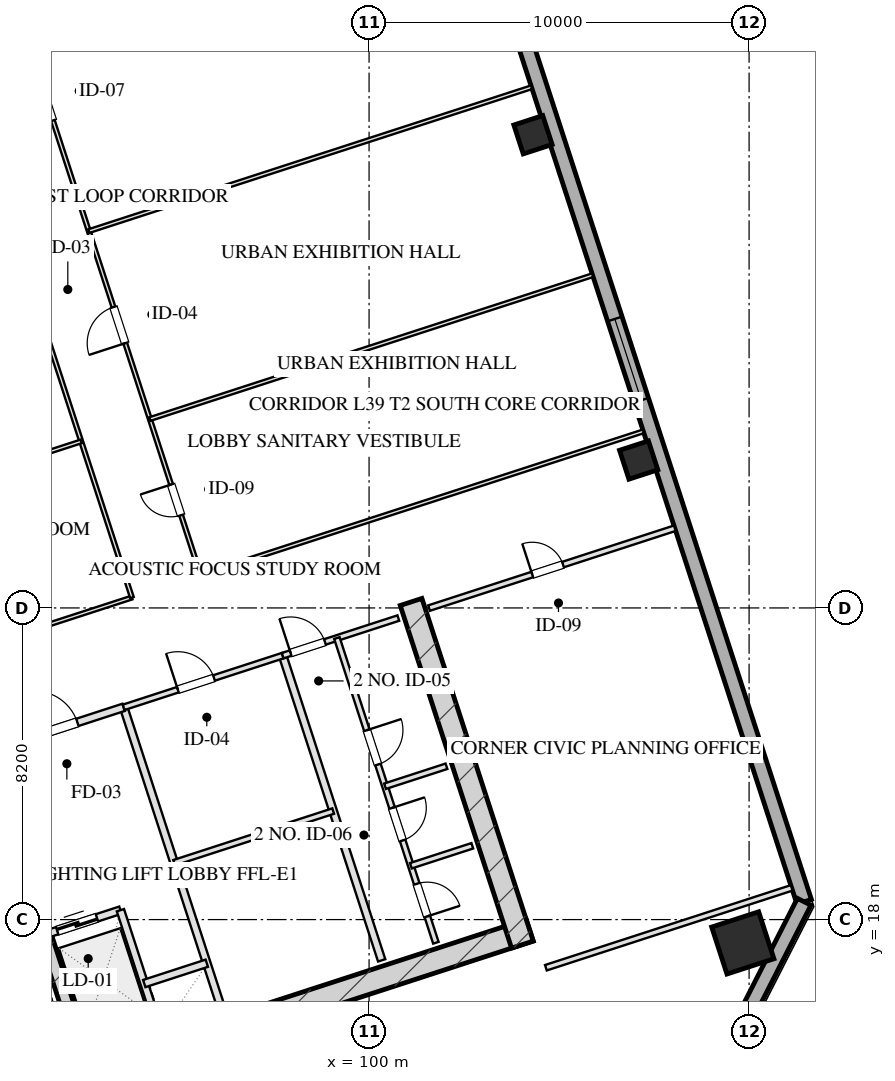
"""IFC4 building model, lengths in metres.
Left out: names, types, materials, properties, quantities, classifications, styles, units other than length and angle.
Written with IfcOpenShell. Run it as: python <this file> out.ifc"""

import sys

from ifc_helpers import new_model, si_unit, direction, frame, frame_2d, origin, origin_2d, place, context, subcontext, project, spatial, rectangle, hollow_rectangle, extrude, element, fill, save


model = new_model("IFC4")
c1 = context("Model", 3, precision=1e-05, world=origin(), true_north=direction((0.0, 1.0)))
c2 = subcontext(c1, "Body", "Model", "MODEL_VIEW")
j1 = project(units=[si_unit("LENGTHUNIT", "METRE"), si_unit("PLANEANGLEUNIT", "RADIAN")], contexts=[c1])
p1 = place(None, origin())
s1 = spatial("IfcSite", under=j1, at=p1, CompositionType="ELEMENT")
p2 = place(p1, origin())
s2 = spatial("IfcBuilding", under=s1, at=p2, CompositionType="ELEMENT")
p3 = place(p2, frame((0.0, 0.0, 149.5)))
s3 = spatial("IfcBuildingStorey", under=s2, at=p3, CompositionType="ELEMENT", Elevation=149.5)
p4 = place(p3, frame((88.63, 12.652, 0.0), z_axis=(0.0, 0.0, 1.0), x_axis=(0.95105714907, 0.309015046886, 0.0)))
e1 = element("IfcWall", 1, at=p4, inside=s3, PredefinedType="SHEAR", context=c2, shape_type="SweptSolid", body=[
    extrude(rectangle(XDim=16.4, YDim=0.6, at=frame_2d((8.2, 0.0))), origin(), (0.0, 0.0, 1.0), 3.45),
])
p5 = place(p3, frame((101.105, 26.358, 0.0), z_axis=(0.0, 0.0, 1.0), x_axis=(0.309010370028, -0.95105866865, 0.0)))
e2 = element("IfcWall", 2, at=p5, inside=s3, PredefinedType="SHEAR", context=c2, shape_type="SweptSolid", body=[
    extrude(rectangle(XDim=9.48, YDim=0.6, at=frame_2d((4.74, 0.0))), origin(), (0.0, 0.0, 1.0), 3.45),
])
p6 = place(p3, frame((90.486, 20.594, 0.0), z_axis=(0.0, 0.0, 1.0), x_axis=(0.309020428229, -0.951055400562, 0.0)))
e3 = element("IfcWall", 3, at=p6, inside=s3, PredefinedType="SHEAR", context=c2, shape_type="SweptSolid", body=[
    extrude(rectangle(XDim=6.98, YDim=0.35, at=frame_2d((3.49, 0.0))), origin(), (0.0, 0.0, 1.0), 3.45),
])
p7 = place(p3, frame((109.835, 17.386, 0.0), z_axis=(0.0, 0.0, 1.0), x_axis=(0.951056516295, 0.309016994375, 0.0)))
e4 = element("IfcColumn", 4, at=p7, inside=s3, PredefinedType="COLUMN", context=c2, shape_type="SweptSolid", body=[
    extrude(hollow_rectangle(XDim=1.3, YDim=1.3, WallThickness=0.045, at=origin_2d()), origin(), (0.0, 0.0, 1.0), 3.451),
])
for number, where, z_axis, x_axis in (
    (5, (107.094, 30.091, 0.0), (0.0, 0.0, 1.0), (0.951, 0.309, 0.0)),
    (6, (104.313, 38.651, 0.0), (0.0, 0.0, 1.0), (0.951, 0.309, 0.0)),
):
    element("IfcColumn", number, at=place(p3, frame(where, z_axis=z_axis, x_axis=x_axis)), inside=s3, PredefinedType="COLUMN", context=c2, shape_type="SweptSolid", body=[
        extrude(hollow_rectangle(XDim=0.8, YDim=0.8, WallThickness=0.028, at=origin_2d()), origin(), (0.0, 0.0, 1.0), 3.451),
    ])
p8 = place(p3, frame((98.224, 59.173, 0.0), z_axis=(0.0, 0.0, 1.0), x_axis=(0.309014228706, -0.951057414911, 0.0)))
e7 = element("IfcWall", 7, at=p8, inside=s3, PredefinedType="SOLIDWALL", context=c2, shape_type="SweptSolid", body=[
    extrude(rectangle(XDim=42.8, YDim=0.4, at=frame_2d((21.4, 0.0))), origin(), (0.0, 0.0, 1.0), 2.61),
])
p9 = place(p8, frame((26.675, 0.0, 0.75)))
e8 = element("IfcOpeningElement", 8, at=p9, cuts=e7, PredefinedType="OPENING", context=c2, shape_type="SweptSolid", body=[
    extrude(rectangle(XDim=2.25, YDim=1.46, at=frame_2d((1.125, 0.73))), frame((0.0, 0.21, 0.0), z_axis=(0.0, -1.0, 0.0), x_axis=(1.0, 0.0, 0.0)), (0.0, 0.0, 1.0), 0.42),
])
p10 = place(p8, frame((13.875, 0.0, 0.75)))
e9 = element("IfcOpeningElement", 9, at=p10, cuts=e7, PredefinedType="OPENING", context=c2, shape_type="SweptSolid", body=[
    extrude(rectangle(XDim=2.25, YDim=1.46, at=frame_2d((1.125, 0.73))), frame((0.0, 0.21, 0.0), z_axis=(0.0, -1.0, 0.0), x_axis=(1.0, 0.0, 0.0)), (0.0, 0.0, 1.0), 0.42),
])
p11 = place(p3, frame((111.449, 18.468, 0.0), z_axis=(0.0, 0.0, 1.0), x_axis=(-0.454019523198, -0.890991735402, 0.0)))
e10 = element("IfcWall", 10, at=p11, inside=s3, PredefinedType="SOLIDWALL", context=c2, shape_type="SweptSolid", body=[
    extrude(rectangle(XDim=3.394, YDim=0.4, at=frame_2d((1.697, 0.0))), origin(), (0.0, 0.0, 1.0), 2.61),
])
p12 = place(p3, frame((93.542, 23.585, 0.0), z_axis=(0.0, 0.0, 1.0), x_axis=(0.309042196757, -0.951048327176, 0.0)))
e11 = element("IfcWall", 11, at=p12, inside=s3, PredefinedType="PARTITIONING", context=c2, shape_type="SweptSolid", body=[
    extrude(rectangle(XDim=8.43, YDim=0.2, at=frame_2d((4.215, 0.0))), origin(), (0.0, 0.0, 1.0), 3.175),
])
p13 = place(p3, frame((89.899, 22.401, 0.0), z_axis=(0.0, 0.0, 1.0), x_axis=(0.951046716504, 0.309047153403, 0.0)))
e12 = element("IfcWall", 12, at=p13, inside=s3, PredefinedType="PARTITIONING", context=c2, shape_type="SweptSolid", body=[
    extrude(rectangle(XDim=3.83, YDim=0.2, at=frame_2d((1.915, 0.0))), origin(), (0.0, 0.0, 1.0), 3.175),
])
p14 = place(p13, frame((1.35, 0.0, 0.0)))
e13 = element("IfcOpeningElement", 13, at=p14, cuts=e12, PredefinedType="OPENING", context=c2, shape_type="SweptSolid", body=[
    extrude(rectangle(XDim=1.2, YDim=2.05, at=frame_2d((0.6, 1.025))), frame((0.0, 0.11, 0.0), z_axis=(0.0, -1.0, 0.0), x_axis=(1.0, 0.0, 0.0)), (0.0, 0.0, 1.0), 0.22),
])
p15 = place(p3, frame((91.46, 17.598, 0.0), z_axis=(0.0, 0.0, 1.0), x_axis=(0.951062257173, 0.308999325213, 0.0)))
e14 = element("IfcWall", 14, at=p15, inside=s3, PredefinedType="PARTITIONING", context=c2, shape_type="SweptSolid", body=[
    extrude(rectangle(XDim=2.1, YDim=0.2, at=frame_2d((1.05, 0.0))), origin(), (0.0, 0.0, 1.0), 3.175),
])
p16 = place(p15, frame((0.35, 0.0, 0.0)))
e15 = element("IfcOpeningElement", 15, at=p16, cuts=e14, PredefinedType="OPENING", context=c2, shape_type="SweptSolid", body=[
    extrude(rectangle(XDim=1.1, YDim=2.05, at=frame_2d((0.55, 1.025))), frame((0.0, 0.11, 0.0), z_axis=(0.0, -1.0, 0.0), x_axis=(1.0, 0.0, 0.0)), (0.0, 0.0, 1.0), 0.22),
])
p17 = place(p3, frame((93.457, 18.247, 0.0), z_axis=(0.0, 0.0, 1.0), x_axis=(0.3089935693, -0.951064127245, 0.0)))
e16 = element("IfcWall", 16, at=p17, inside=s3, PredefinedType="PARTITIONING", context=c2, shape_type="SweptSolid", body=[
    extrude(rectangle(XDim=3.7, YDim=0.2, at=frame_2d((1.85, 0.0))), origin(), (0.0, 0.0, 1.0), 3.175),
])
p18 = place(p3, frame((94.084, 16.317, 0.0), z_axis=(0.0, 0.0, 1.0), x_axis=(0.951041328149, 0.309063734775, 0.0)))
e17 = element("IfcWall", 17, at=p18, inside=s3, PredefinedType="PARTITIONING", context=c2, shape_type="SweptSolid", body=[
    extrude(rectangle(XDim=1.73, YDim=0.2, at=frame_2d((0.865, 0.0))), origin(), (0.0, 0.0, 1.0), 3.175),
])
p19 = place(p3, frame((97.727, 24.944, 0.0), z_axis=(0.0, 0.0, 1.0), x_axis=(0.309016001439, -0.951056838919, 0.0)))
e18 = element("IfcWall", 18, at=p19, inside=s3, PredefinedType="PARTITIONING", context=c2, shape_type="SweptSolid", body=[
    extrude(rectangle(XDim=8.43, YDim=0.2, at=frame_2d((4.215, 0.0))), origin(), (0.0, 0.0, 1.0), 3.175),
])
p20 = place(p3, frame((93.542, 23.585, 0.0), z_axis=(0.0, 0.0, 1.0), x_axis=(0.951063829732, 0.308994485023, 0.0)))
e19 = element("IfcWall", 19, at=p20, inside=s3, PredefinedType="PARTITIONING", context=c2, shape_type="SweptSolid", body=[
    extrude(rectangle(XDim=4.4, YDim=0.15, at=frame_2d((2.2, 0.0))), origin(), (0.0, 0.0, 1.0), 3.175),
])
p21 = place(p20, frame((1.5, 0.0, 0.0)))
e20 = element("IfcOpeningElement", 20, at=p21, cuts=e19, PredefinedType="OPENING", context=c2, shape_type="SweptSolid", body=[
    extrude(rectangle(XDim=1.0, YDim=2.05, at=frame_2d((0.5, 1.025))), frame((0.0, 0.085, 0.0), z_axis=(0.0, -1.0, 0.0), x_axis=(1.0, 0.0, 0.0)), (0.0, 0.0, 1.0), 0.17),
])
p22 = place(p3, frame((94.871, 19.495, 0.0), z_axis=(0.0, 0.0, 1.0), x_axis=(0.951042223598, 0.309060979314, 0.0)))
e21 = element("IfcWall", 21, at=p22, inside=s3, PredefinedType="PARTITIONING", context=c2, shape_type="SweptSolid", body=[
    extrude(rectangle(XDim=4.4, YDim=0.15, at=frame_2d((2.2, 0.0))), origin(), (0.0, 0.0, 1.0), 3.175),
])
p23 = place(p3, frame((97.727, 24.944, 0.0), z_axis=(0.0, 0.0, 1.0), x_axis=(0.951036872128, 0.309077446369, 0.0)))
e22 = element("IfcWall", 22, at=p23, inside=s3, PredefinedType="PARTITIONING", context=c2, shape_type="SweptSolid", body=[
    extrude(rectangle(XDim=3.2, YDim=0.15, at=frame_2d((1.6, 0.0))), origin(), (0.0, 0.0, 1.0), 3.175),
])
p24 = place(p23, frame((0.22, 0.0, 0.0)))
e23 = element("IfcOpeningElement", 23, at=p24, cuts=e22, PredefinedType="OPENING", context=c2, shape_type="SweptSolid", body=[
    extrude(rectangle(XDim=0.95, YDim=2.05, at=frame_2d((0.475, 1.025))), frame((0.0, 0.085, 0.0), z_axis=(0.0, -1.0, 0.0), x_axis=(1.0, 0.0, 0.0)), (0.0, 0.0, 1.0), 0.17),
])
p25 = place(p3, frame((99.153, 25.408, 0.0), z_axis=(0.0, 0.0, 1.0), x_axis=(0.309016001439, -0.951056838919, 0.0)))
e24 = element("IfcWall", 24, at=p25, inside=s3, PredefinedType="PARTITIONING", context=c2, shape_type="SweptSolid", body=[
    extrude(rectangle(XDim=8.43, YDim=0.15, at=frame_2d((4.215, 0.0))), origin(), (0.0, 0.0, 1.0), 3.175),
])
p26 = place(p25, frame((2.55, 0.0, 0.0)))
e25 = element("IfcOpeningElement", 25, at=p26, cuts=e24, PredefinedType="OPENING", context=c2, shape_type="SweptSolid", body=[
    extrude(rectangle(XDim=0.95, YDim=2.05, at=frame_2d((0.475, 1.025))), frame((0.0, 0.085, 0.0), z_axis=(0.0, -1.0, 0.0), x_axis=(1.0, 0.0, 0.0)), (0.0, 0.0, 1.0), 0.17),
])
p27 = place(p25, frame((4.7, 0.0, 0.0)))
e26 = element("IfcOpeningElement", 26, at=p27, cuts=e24, PredefinedType="OPENING", context=c2, shape_type="SweptSolid", body=[
    extrude(rectangle(XDim=0.9, YDim=2.05, at=frame_2d((0.45, 1.025))), frame((0.0, 0.085, 0.0), z_axis=(0.0, -1.0, 0.0), x_axis=(1.0, 0.0, 0.0)), (0.0, 0.0, 1.0), 0.17),
])
p28 = place(p25, frame((6.8, 0.0, 0.0)))
e27 = element("IfcOpeningElement", 27, at=p28, cuts=e24, PredefinedType="OPENING", context=c2, shape_type="SweptSolid", body=[
    extrude(rectangle(XDim=0.9, YDim=2.05, at=frame_2d((0.45, 1.025))), frame((0.0, 0.085, 0.0), z_axis=(0.0, -1.0, 0.0), x_axis=(1.0, 0.0, 0.0)), (0.0, 0.0, 1.0), 0.17),
])
p29 = place(p3, frame((100.42, 21.509, 0.0), z_axis=(0.0, 0.0, 1.0), x_axis=(0.951040401051, 0.309066587596, 0.0)))
e28 = element("IfcWall", 28, at=p29, inside=s3, PredefinedType="PARTITIONING", context=c2, shape_type="SweptSolid", body=[
    extrude(rectangle(XDim=1.7, YDim=0.15, at=frame_2d((0.85, 0.0))), origin(), (0.0, 0.0, 1.0), 3.175),
])
p30 = place(p3, frame((101.1, 19.416, 0.0), z_axis=(0.0, 0.0, 1.0), x_axis=(0.951054116971, 0.309024378638, 0.0)))
e29 = element("IfcWall", 29, at=p30, inside=s3, PredefinedType="PARTITIONING", context=c2, shape_type="SweptSolid", body=[
    extrude(rectangle(XDim=1.7, YDim=0.15, at=frame_2d((0.85, 0.0))), origin(), (0.0, 0.0, 1.0), 3.175),
])
p31 = place(p3, frame((104.653, 16.733, 0.0), z_axis=(0.0, 0.0, 1.0), x_axis=(0.951054383043, 0.309023559774, 0.0)))
e30 = element("IfcWall", 30, at=p31, inside=s3, PredefinedType="PARTITIONING", context=c2, shape_type="SweptSolid", body=[
    extrude(rectangle(XDim=6.8, YDim=0.15, at=frame_2d((3.4, 0.0))), origin(), (0.0, 0.0, 1.0), 3.175),
])
p32 = place(p3, frame((101.578, 26.196, 0.0), z_axis=(0.0, 0.0, 1.0), x_axis=(0.951064934653, 0.308991084134, 0.0)))
e31 = element("IfcWall", 31, at=p32, inside=s3, PredefinedType="PARTITIONING", context=c2, shape_type="SweptSolid", body=[
    extrude(rectangle(XDim=6.8, YDim=0.15, at=frame_2d((3.4, 0.0))), origin(), (0.0, 0.0, 1.0), 3.175),
])
p33 = place(p32, frame((2.856, 0.0, 0.0)))
e32 = element("IfcOpeningElement", 32, at=p33, cuts=e31, PredefinedType="OPENING", context=c2, shape_type="SweptSolid", body=[
    extrude(rectangle(XDim=0.85, YDim=2.05, at=frame_2d((0.425, 1.025))), frame((0.0, 0.085, 0.0), z_axis=(0.0, -1.0, 0.0), x_axis=(1.0, 0.0, 0.0)), (0.0, 0.0, 1.0), 0.17),
])
p34 = place(p3, frame((85.248, 23.708, 0.0), z_axis=(0.0, 0.0, 1.0), x_axis=(0.951059123431, 0.309008970321, 0.0)))
e33 = element("IfcWall", 33, at=p34, inside=s3, PredefinedType="MOVABLE", context=c2, shape_type="SweptSolid", body=[
    extrude(rectangle(XDim=8.95, YDim=0.1, at=frame_2d((4.475, 0.0))), origin(), (0.0, 0.0, 1.0), 3.175),
])
p35 = place(p3, frame((95.567, 27.061, 0.0), z_axis=(0.0, 0.0, 1.0), x_axis=(0.9510516424, 0.30903199428, 0.0)))
e34 = element("IfcWall", 34, at=p35, inside=s3, PredefinedType="MOVABLE", context=c2, shape_type="SweptSolid", body=[
    extrude(rectangle(XDim=12.25, YDim=0.1, at=frame_2d((6.125, 0.0))), origin(), (0.0, 0.0, 1.0), 3.175),
])
p36 = place(p3, frame((93.76, 26.473, 0.0), z_axis=(0.0, 0.0, 1.0), x_axis=(-0.309004459387, 0.951060589068, 0.0)))
e35 = element("IfcWall", 35, at=p36, inside=s3, PredefinedType="MOVABLE", context=c2, shape_type="SweptSolid", body=[
    extrude(rectangle(XDim=16.64, YDim=0.1, at=frame_2d((8.32, 0.0))), origin(), (0.0, 0.0, 1.0), 3.175),
])
p37 = place(p36, frame((7.68, 0.0, 0.0)))
e36 = element("IfcOpeningElement", 36, at=p37, cuts=e35, PredefinedType="OPENING", context=c2, shape_type="SweptSolid", body=[
    extrude(rectangle(XDim=1.1, YDim=2.05, at=frame_2d((0.55, 1.025))), frame((0.0, 0.06, 0.0), z_axis=(0.0, -1.0, 0.0), x_axis=(1.0, 0.0, 0.0)), (0.0, 0.0, 1.0), 0.12),
])
p38 = place(p3, frame((95.567, 27.061, 0.0), z_axis=(0.0, 0.0, 1.0), x_axis=(-0.30901773025, 0.951056277195, 0.0)))
e37 = element("IfcWall", 37, at=p38, inside=s3, PredefinedType="MOVABLE", context=c2, shape_type="SweptSolid", body=[
    extrude(rectangle(XDim=16.64, YDim=0.1, at=frame_2d((8.32, 0.0))), origin(), (0.0, 0.0, 1.0), 3.175),
])
p39 = place(p38, frame((1.66, 0.0, 0.0)))
e38 = element("IfcOpeningElement", 38, at=p39, cuts=e37, PredefinedType="OPENING", context=c2, shape_type="SweptSolid", body=[
    extrude(rectangle(XDim=0.85, YDim=2.05, at=frame_2d((0.425, 1.025))), frame((0.0, 0.06, 0.0), z_axis=(0.0, -1.0, 0.0), x_axis=(1.0, 0.0, 0.0)), (0.0, 0.0, 1.0), 0.12),
])
p40 = place(p38, frame((6.42, 0.0, 0.0)))
e39 = element("IfcOpeningElement", 39, at=p40, cuts=e37, PredefinedType="OPENING", context=c2, shape_type="SweptSolid", body=[
    extrude(rectangle(XDim=1.0, YDim=2.05, at=frame_2d((0.5, 1.025))), frame((0.0, 0.06, 0.0), z_axis=(0.0, -1.0, 0.0), x_axis=(1.0, 0.0, 0.0)), (0.0, 0.0, 1.0), 0.12),
])
p41 = place(p38, frame((12.58, 0.0, 0.0)))
e40 = element("IfcOpeningElement", 40, at=p41, cuts=e37, PredefinedType="OPENING", context=c2, shape_type="SweptSolid", body=[
    extrude(rectangle(XDim=1.05, YDim=2.05, at=frame_2d((0.525, 1.025))), frame((0.0, 0.06, 0.0), z_axis=(0.0, -1.0, 0.0), x_axis=(1.0, 0.0, 0.0)), (0.0, 0.0, 1.0), 0.12),
])
p42 = place(p3, frame((83.913, 27.816, 0.0), z_axis=(0.0, 0.0, 1.0), x_axis=(0.951059123431, 0.309008970321, 0.0)))
e41 = element("IfcWall", 41, at=p42, inside=s3, PredefinedType="MOVABLE", context=c2, shape_type="SweptSolid", body=[
    extrude(rectangle(XDim=8.95, YDim=0.1, at=frame_2d((4.475, 0.0))), origin(), (0.0, 0.0, 1.0), 3.175),
])
for number, where, z_axis, x_axis in (
    (42, (94.232, 31.169, 0.0), (0.0, 0.0, 1.0), (0.951, 0.309, 0.0)),
    (43, (92.625, 36.115, 0.0), (0.0, 0.0, 1.0), (0.951, 0.309, 0.0)),
):
    element("IfcWall", number, at=place(p3, frame(where, z_axis=z_axis, x_axis=x_axis)), inside=s3, PredefinedType="MOVABLE", context=c2, shape_type="SweptSolid", body=[
        extrude(rectangle(XDim=12.25, YDim=0.1, at=frame_2d((6.125, 0.0))), origin(), (0.0, 0.0, 1.0), 3.175),
    ])
p43 = place(p9, origin())
e44 = element("IfcWindow", 44, at=p43, inside=s3, PartitioningType="TRIPLE_PANEL_VERTICAL", PredefinedType="WINDOW", context=c2, shape_type="SweptSolid", body=[
    extrude(rectangle(XDim=2.25, YDim=1.46, at=frame_2d((1.125, 0.73))), frame((0.0, 0.03, 0.0), z_axis=(0.0, -1.0, 0.0), x_axis=(1.0, 0.0, 0.0)), (0.0, 0.0, 1.0), 0.06),
])
fill(e8, e44)
p44 = place(p14, origin())
e45 = element("IfcDoor", 45, at=p44, inside=s3, OperationType="SINGLE_SWING_LEFT", PredefinedType="DOOR", context=c2, shape_type="SweptSolid", body=[
    extrude(rectangle(XDim=1.2, YDim=2.05, at=frame_2d((0.6, 1.025))), frame((0.0, 0.025, 0.0), z_axis=(0.0, -1.0, 0.0), x_axis=(1.0, 0.0, 0.0)), (0.0, 0.0, 1.0), 0.05),
])
fill(e13, e45)
p45 = place(p16, origin())
e46 = element("IfcDoor", 46, at=p45, inside=s3, OperationType="DOUBLE_DOOR_SLIDING", PredefinedType="DOOR", context=c2, shape_type="SweptSolid", body=[
    extrude(rectangle(XDim=1.1, YDim=2.05, at=frame_2d((0.55, 1.025))), frame((0.0, 0.025, 0.0), z_axis=(0.0, -1.0, 0.0), x_axis=(1.0, 0.0, 0.0)), (0.0, 0.0, 1.0), 0.05),
])
fill(e15, e46)
p46 = place(p21, origin())
e47 = element("IfcDoor", 47, at=p46, inside=s3, OperationType="SINGLE_SWING_LEFT", PredefinedType="DOOR", context=c2, shape_type="SweptSolid", body=[
    extrude(rectangle(XDim=1.0, YDim=2.05, at=frame_2d((0.5, 1.025))), frame((0.0, 0.025, 0.0), z_axis=(0.0, -1.0, 0.0), x_axis=(1.0, 0.0, 0.0)), (0.0, 0.0, 1.0), 0.05),
])
fill(e20, e47)
p47 = place(p24, origin())
e48 = element("IfcDoor", 48, at=p47, inside=s3, OperationType="SINGLE_SWING_LEFT", PredefinedType="DOOR", context=c2, shape_type="SweptSolid", body=[
    extrude(rectangle(XDim=0.95, YDim=2.05, at=frame_2d((0.475, 1.025))), frame((0.0, 0.025, 0.0), z_axis=(0.0, -1.0, 0.0), x_axis=(1.0, 0.0, 0.0)), (0.0, 0.0, 1.0), 0.05),
])
fill(e23, e48)
p48 = place(p26, origin())
e49 = element("IfcDoor", 49, at=p48, inside=s3, OperationType="SINGLE_SWING_LEFT", PredefinedType="DOOR", context=c2, shape_type="SweptSolid", body=[
    extrude(rectangle(XDim=0.95, YDim=2.05, at=frame_2d((0.475, 1.025))), frame((0.0, 0.025, 0.0), z_axis=(0.0, -1.0, 0.0), x_axis=(1.0, 0.0, 0.0)), (0.0, 0.0, 1.0), 0.05),
])
fill(e25, e49)
p49 = place(p27, origin())
e50 = element("IfcDoor", 50, at=p49, inside=s3, OperationType="SINGLE_SWING_LEFT", PredefinedType="DOOR", context=c2, shape_type="SweptSolid", body=[
    extrude(rectangle(XDim=0.9, YDim=2.05, at=frame_2d((0.45, 1.025))), frame((0.0, 0.025, 0.0), z_axis=(0.0, -1.0, 0.0), x_axis=(1.0, 0.0, 0.0)), (0.0, 0.0, 1.0), 0.05),
])
fill(e26, e50)
p50 = place(p28, origin())
e51 = element("IfcDoor", 51, at=p50, inside=s3, OperationType="SINGLE_SWING_RIGHT", PredefinedType="DOOR", context=c2, shape_type="SweptSolid", body=[
    extrude(rectangle(XDim=0.9, YDim=2.05, at=frame_2d((0.45, 1.025))), frame((0.0, 0.025, 0.0), z_axis=(0.0, -1.0, 0.0), x_axis=(1.0, 0.0, 0.0)), (0.0, 0.0, 1.0), 0.05),
])
fill(e27, e51)
p51 = place(p33, origin())
e52 = element("IfcDoor", 52, at=p51, inside=s3, OperationType="SINGLE_SWING_LEFT", PredefinedType="DOOR", context=c2, shape_type="SweptSolid", body=[
    extrude(rectangle(XDim=0.85, YDim=2.05, at=frame_2d((0.425, 1.025))), frame((0.0, 0.025, 0.0), z_axis=(0.0, -1.0, 0.0), x_axis=(1.0, 0.0, 0.0)), (0.0, 0.0, 1.0), 0.05),
])
fill(e32, e52)
p52 = place(p39, origin())
e53 = element("IfcDoor", 53, at=p52, inside=s3, OperationType="SINGLE_SWING_RIGHT", PredefinedType="DOOR", context=c2, shape_type="SweptSolid", body=[
    extrude(rectangle(XDim=0.85, YDim=2.05, at=frame_2d((0.425, 1.025))), frame((0.0, 0.025, 0.0), z_axis=(0.0, -1.0, 0.0), x_axis=(1.0, 0.0, 0.0)), (0.0, 0.0, 1.0), 0.05),
])
fill(e38, e53)
p53 = place(p40, origin())
e54 = element("IfcDoor", 54, at=p53, inside=s3, OperationType="SINGLE_SWING_LEFT", PredefinedType="DOOR", context=c2, shape_type="SweptSolid", body=[
    extrude(rectangle(XDim=1.0, YDim=2.05, at=frame_2d((0.5, 1.025))), frame((0.0, 0.025, 0.0), z_axis=(0.0, -1.0, 0.0), x_axis=(1.0, 0.0, 0.0)), (0.0, 0.0, 1.0), 0.05),
])
fill(e39, e54)
p54 = place(p41, origin())
e55 = element("IfcDoor", 55, at=p54, inside=s3, OperationType="SINGLE_SWING_RIGHT", PredefinedType="DOOR", context=c2, shape_type="SweptSolid", body=[
    extrude(rectangle(XDim=1.05, YDim=2.05, at=frame_2d((0.525, 1.025))), frame((0.0, 0.025, 0.0), z_axis=(0.0, -1.0, 0.0), x_axis=(1.0, 0.0, 0.0)), (0.0, 0.0, 1.0), 0.05),
])
fill(e40, e55)
save(model, sys.argv[1])
